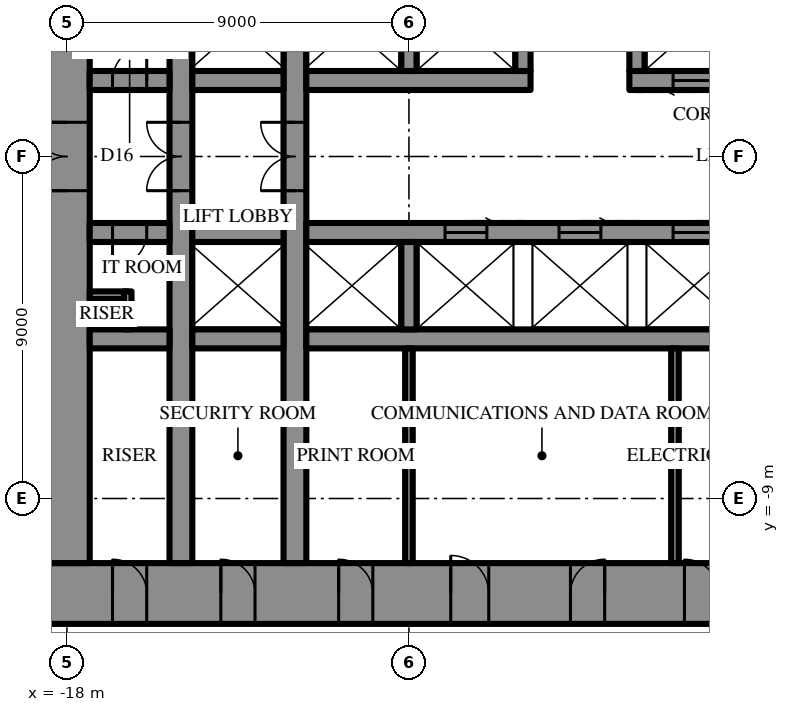
"""IFC4 building model, lengths in metres.
Left out: names, types, materials, properties, quantities, classifications, styles, units other than length and angle.
Written with IfcOpenShell. Run it as: python <this file> out.ifc"""

import sys

from ifc_helpers import new_model, si_unit, direction, frame, frame_2d, origin, place, context, subcontext, project, spatial, rectangle, extrude, element, fill, save


model = new_model("IFC4")
c1 = context("Model", 3, precision=1e-05, world=origin(), true_north=direction((0.0, 1.0)))
c2 = subcontext(c1, "Body", "Model", "MODEL_VIEW")
j1 = project(units=[si_unit("LENGTHUNIT", "METRE"), si_unit("PLANEANGLEUNIT", "RADIAN")], contexts=[c1])
p1 = place(None, origin())
s1 = spatial("IfcSite", under=j1, at=p1, CompositionType="ELEMENT")
p2 = place(p1, origin())
s2 = spatial("IfcBuilding", under=s1, at=p2, CompositionType="ELEMENT")
p3 = place(p2, frame((0.0, 0.0, 123.7)))
s3 = spatial("IfcBuildingStorey", under=s2, at=p3, CompositionType="ELEMENT", Elevation=123.7)
p4 = place(p3, frame((18.6, -11.5, 0.0), z_axis=(0.0, 0.0, 1.0), x_axis=(-1.0, 0.0, 0.0)))
e1 = element("IfcWall", 1, at=p4, inside=s3, PredefinedType="SHEAR", context=c2, shape_type="SweptSolid", body=[
    extrude(rectangle(XDim=37.2, YDim=1.6, at=frame_2d((18.6, 0.0))), origin(), (0.0, 0.0, 1.0), 4.2),
])
p5 = place(p4, frame((19.45, 0.0, 0.0)))
e2 = element("IfcOpeningElement", 2, at=p5, cuts=e1, PredefinedType="OPENING", context=c2, shape_type="SweptSolid", body=[
    extrude(rectangle(XDim=0.9, YDim=2.2, at=frame_2d((0.45, 1.1))), frame((0.0, 0.81, 0.0), z_axis=(0.0, -1.0, 0.0), x_axis=(1.0, 0.0, 0.0)), (0.0, 0.0, 1.0), 1.62),
])
p6 = place(p4, frame((22.45, 0.0, 0.0)))
e3 = element("IfcOpeningElement", 3, at=p6, cuts=e1, PredefinedType="OPENING", context=c2, shape_type="SweptSolid", body=[
    extrude(rectangle(XDim=0.9, YDim=2.2, at=frame_2d((0.45, 1.1))), frame((0.0, 0.81, 0.0), z_axis=(0.0, -1.0, 0.0), x_axis=(1.0, 0.0, 0.0)), (0.0, 0.0, 1.0), 1.62),
])
p7 = place(p4, frame((25.5, 0.0, 0.0)))
e4 = element("IfcOpeningElement", 4, at=p7, cuts=e1, PredefinedType="OPENING", context=c2, shape_type="SweptSolid", body=[
    extrude(rectangle(XDim=1.0, YDim=2.2, at=frame_2d((0.5, 1.1))), frame((0.0, 0.81, 0.0), z_axis=(0.0, -1.0, 0.0), x_axis=(1.0, 0.0, 0.0)), (0.0, 0.0, 1.0), 1.62),
])
p8 = place(p4, frame((1.8, 0.0, 0.0)))
e5 = element("IfcOpeningElement", 5, at=p8, cuts=e1, PredefinedType="OPENING", context=c2, shape_type="SweptSolid", body=[
    extrude(rectangle(XDim=0.9, YDim=2.2, at=frame_2d((0.45, 1.1))), frame((0.0, 0.81, 0.0), z_axis=(0.0, -1.0, 0.0), x_axis=(1.0, 0.0, 0.0)), (0.0, 0.0, 1.0), 1.62),
])
p9 = place(p4, frame((4.65, 0.0, 0.0)))
e6 = element("IfcOpeningElement", 6, at=p9, cuts=e1, PredefinedType="OPENING", context=c2, shape_type="SweptSolid", body=[
    extrude(rectangle(XDim=0.9, YDim=2.2, at=frame_2d((0.45, 1.1))), frame((0.0, 0.81, 0.0), z_axis=(0.0, -1.0, 0.0), x_axis=(1.0, 0.0, 0.0)), (0.0, 0.0, 1.0), 1.62),
])
p10 = place(p4, frame((7.75, 0.0, 0.0)))
e7 = element("IfcOpeningElement", 7, at=p10, cuts=e1, PredefinedType="OPENING", context=c2, shape_type="SweptSolid", body=[
    extrude(rectangle(XDim=0.9, YDim=2.2, at=frame_2d((0.45, 1.1))), frame((0.0, 0.81, 0.0), z_axis=(0.0, -1.0, 0.0), x_axis=(1.0, 0.0, 0.0)), (0.0, 0.0, 1.0), 1.62),
])
p11 = place(p4, frame((28.55, 0.0, 0.0)))
e8 = element("IfcOpeningElement", 8, at=p11, cuts=e1, PredefinedType="OPENING", context=c2, shape_type="SweptSolid", body=[
    extrude(rectangle(XDim=0.9, YDim=2.2, at=frame_2d((0.45, 1.1))), frame((0.0, 0.81, 0.0), z_axis=(0.0, -1.0, 0.0), x_axis=(1.0, 0.0, 0.0)), (0.0, 0.0, 1.0), 1.62),
])
p12 = place(p4, frame((31.65, 0.0, 0.0)))
e9 = element("IfcOpeningElement", 9, at=p12, cuts=e1, PredefinedType="OPENING", context=c2, shape_type="SweptSolid", body=[
    extrude(rectangle(XDim=0.9, YDim=2.2, at=frame_2d((0.45, 1.1))), frame((0.0, 0.81, 0.0), z_axis=(0.0, -1.0, 0.0), x_axis=(1.0, 0.0, 0.0)), (0.0, 0.0, 1.0), 1.62),
])
p13 = place(p4, frame((34.5, 0.0, 0.0)))
e10 = element("IfcOpeningElement", 10, at=p13, cuts=e1, PredefinedType="OPENING", context=c2, shape_type="SweptSolid", body=[
    extrude(rectangle(XDim=0.9, YDim=2.2, at=frame_2d((0.45, 1.1))), frame((0.0, 0.81, 0.0), z_axis=(0.0, -1.0, 0.0), x_axis=(1.0, 0.0, 0.0)), (0.0, 0.0, 1.0), 1.62),
])
p14 = place(p3, frame((-18.0, 10.7, 0.0), z_axis=(0.0, 0.0, 1.0), x_axis=(0.0, -1.0, 0.0)))
e11 = element("IfcWall", 11, at=p14, inside=s3, PredefinedType="SHEAR", context=c2, shape_type="SweptSolid", body=[
    extrude(rectangle(XDim=21.4, YDim=1.2, at=frame_2d((10.7, 0.0))), origin(), (0.0, 0.0, 1.0), 4.2),
])
p15 = place(p14, frame((9.8, 0.0, 0.0)))
e12 = element("IfcOpeningElement", 12, at=p15, cuts=e11, PredefinedType="OPENING", context=c2, shape_type="SweptSolid", body=[
    extrude(rectangle(XDim=1.8, YDim=2.4, at=frame_2d((0.9, 1.2))), frame((0.0, 0.61, 0.0), z_axis=(0.0, -1.0, 0.0), x_axis=(1.0, 0.0, 0.0)), (0.0, 0.0, 1.0), 1.22),
])
p16 = place(p3, frame((-12.0, -10.7, 0.0), z_axis=(0.0, 0.0, 1.0), x_axis=(0.0, 1.0, 0.0)))
e13 = element("IfcWall", 13, at=p16, inside=s3, PredefinedType="SHEAR", context=c2, shape_type="SweptSolid", body=[
    extrude(rectangle(XDim=21.4, YDim=0.6, at=frame_2d((10.7, 0.0))), origin(), (0.0, 0.0, 1.0), 4.2),
])
p17 = place(p16, frame((9.8, 0.0, 0.0)))
e14 = element("IfcOpeningElement", 14, at=p17, cuts=e13, PredefinedType="OPENING", context=c2, shape_type="SweptSolid", body=[
    extrude(rectangle(XDim=1.8, YDim=2.4, at=frame_2d((0.9, 1.2))), frame((0.0, 0.31, 0.0), z_axis=(0.0, -1.0, 0.0), x_axis=(1.0, 0.0, 0.0)), (0.0, 0.0, 1.0), 0.62),
])
p18 = place(p3, frame((-15.0, -10.7, 0.0), z_axis=(0.0, 0.0, 1.0), x_axis=(0.0, 1.0, 0.0)))
e15 = element("IfcWall", 15, at=p18, inside=s3, PredefinedType="SHEAR", context=c2, shape_type="SweptSolid", body=[
    extrude(rectangle(XDim=21.4, YDim=0.6, at=frame_2d((10.7, 0.0))), origin(), (0.0, 0.0, 1.0), 4.2),
])
p19 = place(p18, frame((9.8, 0.0, 0.0)))
e16 = element("IfcOpeningElement", 16, at=p19, cuts=e15, PredefinedType="OPENING", context=c2, shape_type="SweptSolid", body=[
    extrude(rectangle(XDim=1.8, YDim=2.4, at=frame_2d((0.9, 1.2))), frame((0.0, 0.31, 0.0), z_axis=(0.0, -1.0, 0.0), x_axis=(1.0, 0.0, 0.0)), (0.0, 0.0, 1.0), 0.62),
])
p20 = place(p3, frame((-17.4, 2.0, 0.0), z_axis=(0.0, 0.0, 1.0), x_axis=(1.0, 0.0, 0.0)))
e17 = element("IfcWall", 17, at=p20, inside=s3, PredefinedType="SHEAR", context=c2, shape_type="SweptSolid", body=[
    extrude(rectangle(XDim=2.1, YDim=0.5, at=frame_2d((1.05, 0.0))), origin(), (0.0, 0.0, 1.0), 4.2),
])
p21 = place(p20, frame((0.6, 0.0, 0.0)))
e18 = element("IfcOpeningElement", 18, at=p21, cuts=e17, PredefinedType="OPENING", context=c2, shape_type="SweptSolid", body=[
    extrude(rectangle(XDim=0.9, YDim=2.2, at=frame_2d((0.45, 1.1))), frame((0.0, 0.26, 0.0), z_axis=(0.0, -1.0, 0.0), x_axis=(1.0, 0.0, 0.0)), (0.0, 0.0, 1.0), 0.52),
])
p22 = place(p3, frame((-14.7, 2.0, 0.0), z_axis=(0.0, 0.0, 1.0), x_axis=(1.0, 0.0, 0.0)))
e19 = element("IfcWall", 19, at=p22, inside=s3, PredefinedType="SHEAR", context=c2, shape_type="SweptSolid", body=[
    extrude(rectangle(XDim=2.4, YDim=0.5, at=frame_2d((1.2, 0.0))), origin(), (0.0, 0.0, 1.0), 4.2),
])
p23 = place(p3, frame((-11.7, 2.0, 0.0), z_axis=(0.0, 0.0, 1.0), x_axis=(1.0, 0.0, 0.0)))
e20 = element("IfcWall", 20, at=p23, inside=s3, PredefinedType="SHEAR", context=c2, shape_type="SweptSolid", body=[
    extrude(rectangle(XDim=5.9, YDim=0.5, at=frame_2d((2.95, 0.0))), origin(), (0.0, 0.0, 1.0), 4.2),
])
p24 = place(p3, frame((-3.2, 2.0, 0.0), z_axis=(0.0, 0.0, 1.0), x_axis=(1.0, 0.0, 0.0)))
e21 = element("IfcWall", 21, at=p24, inside=s3, PredefinedType="SHEAR", context=c2, shape_type="SweptSolid", body=[
    extrude(rectangle(XDim=14.9, YDim=0.5, at=frame_2d((7.45, 0.0))), origin(), (0.0, 0.0, 1.0), 4.2),
])
p25 = place(p24, frame((1.15, 0.0, 0.0)))
e22 = element("IfcOpeningElement", 22, at=p25, cuts=e21, PredefinedType="OPENING", context=c2, shape_type="SweptSolid", body=[
    extrude(rectangle(XDim=1.1, YDim=2.2, at=frame_2d((0.55, 1.1))), frame((0.0, 0.26, 0.0), z_axis=(0.0, -1.0, 0.0), x_axis=(1.0, 0.0, 0.0)), (0.0, 0.0, 1.0), 0.52),
])
p26 = place(p24, frame((4.15, 0.0, 0.0)))
e23 = element("IfcOpeningElement", 23, at=p26, cuts=e21, PredefinedType="OPENING", context=c2, shape_type="SweptSolid", body=[
    extrude(rectangle(XDim=1.1, YDim=2.2, at=frame_2d((0.55, 1.1))), frame((0.0, 0.26, 0.0), z_axis=(0.0, -1.0, 0.0), x_axis=(1.0, 0.0, 0.0)), (0.0, 0.0, 1.0), 0.52),
])
p27 = place(p24, frame((7.15, 0.0, 0.0)))
e24 = element("IfcOpeningElement", 24, at=p27, cuts=e21, PredefinedType="OPENING", context=c2, shape_type="SweptSolid", body=[
    extrude(rectangle(XDim=1.1, YDim=2.2, at=frame_2d((0.55, 1.1))), frame((0.0, 0.26, 0.0), z_axis=(0.0, -1.0, 0.0), x_axis=(1.0, 0.0, 0.0)), (0.0, 0.0, 1.0), 0.52),
])
p28 = place(p24, frame((10.15, 0.0, 0.0)))
e25 = element("IfcOpeningElement", 25, at=p28, cuts=e21, PredefinedType="OPENING", context=c2, shape_type="SweptSolid", body=[
    extrude(rectangle(XDim=1.1, YDim=2.2, at=frame_2d((0.55, 1.1))), frame((0.0, 0.26, 0.0), z_axis=(0.0, -1.0, 0.0), x_axis=(1.0, 0.0, 0.0)), (0.0, 0.0, 1.0), 0.52),
])
for number, where, z_axis, x_axis in (
    (26, (-9.0, 2.25, 0.0), (0.0, 0.0, 1.0), (0.0, 1.0, 0.0)),
    (27, (-6.0, 2.25, 0.0), (0.0, 0.0, 1.0), (0.0, 1.0, 0.0)),
    (28, (-3.0, 2.25, 0.0), (0.0, 0.0, 1.0), (0.0, 1.0, 0.0)),
):
    element("IfcWall", number, at=place(p3, frame(where, z_axis=z_axis, x_axis=x_axis)), inside=s3, PredefinedType="SHEAR", context=c2, shape_type="SweptSolid", body=[
        extrude(rectangle(XDim=2.3, YDim=0.4, at=frame_2d((1.15, 0.0))), origin(), (0.0, 0.0, 1.0), 4.2),
    ])
p29 = place(p3, frame((3.2, -2.0, 0.0), z_axis=(0.0, 0.0, 1.0), x_axis=(-1.0, 0.0, 0.0)))
e29 = element("IfcWall", 29, at=p29, inside=s3, PredefinedType="SHEAR", context=c2, shape_type="SweptSolid", body=[
    extrude(rectangle(XDim=14.9, YDim=0.5, at=frame_2d((7.45, 0.0))), origin(), (0.0, 0.0, 1.0), 4.2),
])
p30 = place(p29, frame((1.15, 0.0, 0.0)))
e30 = element("IfcOpeningElement", 30, at=p30, cuts=e29, PredefinedType="OPENING", context=c2, shape_type="SweptSolid", body=[
    extrude(rectangle(XDim=1.1, YDim=2.2, at=frame_2d((0.55, 1.1))), frame((0.0, 0.26, 0.0), z_axis=(0.0, -1.0, 0.0), x_axis=(1.0, 0.0, 0.0)), (0.0, 0.0, 1.0), 0.52),
])
p31 = place(p29, frame((4.15, 0.0, 0.0)))
e31 = element("IfcOpeningElement", 31, at=p31, cuts=e29, PredefinedType="OPENING", context=c2, shape_type="SweptSolid", body=[
    extrude(rectangle(XDim=1.1, YDim=2.2, at=frame_2d((0.55, 1.1))), frame((0.0, 0.26, 0.0), z_axis=(0.0, -1.0, 0.0), x_axis=(1.0, 0.0, 0.0)), (0.0, 0.0, 1.0), 0.52),
])
p32 = place(p29, frame((7.15, 0.0, 0.0)))
e32 = element("IfcOpeningElement", 32, at=p32, cuts=e29, PredefinedType="OPENING", context=c2, shape_type="SweptSolid", body=[
    extrude(rectangle(XDim=1.1, YDim=2.2, at=frame_2d((0.55, 1.1))), frame((0.0, 0.26, 0.0), z_axis=(0.0, -1.0, 0.0), x_axis=(1.0, 0.0, 0.0)), (0.0, 0.0, 1.0), 0.52),
])
p33 = place(p29, frame((10.15, 0.0, 0.0)))
e33 = element("IfcOpeningElement", 33, at=p33, cuts=e29, PredefinedType="OPENING", context=c2, shape_type="SweptSolid", body=[
    extrude(rectangle(XDim=1.1, YDim=2.2, at=frame_2d((0.55, 1.1))), frame((0.0, 0.26, 0.0), z_axis=(0.0, -1.0, 0.0), x_axis=(1.0, 0.0, 0.0)), (0.0, 0.0, 1.0), 0.52),
])
p34 = place(p3, frame((-12.3, -2.0, 0.0), z_axis=(0.0, 0.0, 1.0), x_axis=(-1.0, 0.0, 0.0)))
e34 = element("IfcWall", 34, at=p34, inside=s3, PredefinedType="SHEAR", context=c2, shape_type="SweptSolid", body=[
    extrude(rectangle(XDim=2.4, YDim=0.5, at=frame_2d((1.2, 0.0))), origin(), (0.0, 0.0, 1.0), 4.2),
])
p35 = place(p3, frame((-15.3, -2.0, 0.0), z_axis=(0.0, 0.0, 1.0), x_axis=(-1.0, 0.0, 0.0)))
e35 = element("IfcWall", 35, at=p35, inside=s3, PredefinedType="SHEAR", context=c2, shape_type="SweptSolid", body=[
    extrude(rectangle(XDim=2.1, YDim=0.5, at=frame_2d((1.05, 0.0))), origin(), (0.0, 0.0, 1.0), 4.2),
])
p36 = place(p35, frame((0.6, 0.0, 0.0)))
e36 = element("IfcOpeningElement", 36, at=p36, cuts=e35, PredefinedType="OPENING", context=c2, shape_type="SweptSolid", body=[
    extrude(rectangle(XDim=0.9, YDim=2.2, at=frame_2d((0.45, 1.1))), frame((0.0, 0.26, 0.0), z_axis=(0.0, -1.0, 0.0), x_axis=(1.0, 0.0, 0.0)), (0.0, 0.0, 1.0), 0.52),
])
p37 = place(p3, frame((11.7, -4.8, 0.0), z_axis=(0.0, 0.0, 1.0), x_axis=(-1.0, 0.0, 0.0)))
e37 = element("IfcWall", 37, at=p37, inside=s3, PredefinedType="SHEAR", context=c2, shape_type="SweptSolid", body=[
    extrude(rectangle(XDim=23.4, YDim=0.5, at=frame_2d((11.7, 0.0))), origin(), (0.0, 0.0, 1.0), 4.2),
])
p38 = place(p37, frame((6.6, 0.0, 0.0)))
e38 = element("IfcOpeningElement", 38, at=p38, cuts=e37, PredefinedType="OPENING", context=c2, shape_type="SweptSolid", body=[
    extrude(rectangle(XDim=1.2, YDim=2.2, at=frame_2d((0.6, 1.1))), frame((0.0, 0.26, 0.0), z_axis=(0.0, -1.0, 0.0), x_axis=(1.0, 0.0, 0.0)), (0.0, 0.0, 1.0), 0.52),
])
p39 = place(p37, frame((3.6, 0.0, 0.0)))
e39 = element("IfcOpeningElement", 39, at=p39, cuts=e37, PredefinedType="OPENING", context=c2, shape_type="SweptSolid", body=[
    extrude(rectangle(XDim=1.2, YDim=2.2, at=frame_2d((0.6, 1.1))), frame((0.0, 0.26, 0.0), z_axis=(0.0, -1.0, 0.0), x_axis=(1.0, 0.0, 0.0)), (0.0, 0.0, 1.0), 0.52),
])
p40 = place(p3, frame((-12.3, -4.8, 0.0), z_axis=(0.0, 0.0, 1.0), x_axis=(-1.0, 0.0, 0.0)))
e40 = element("IfcWall", 40, at=p40, inside=s3, PredefinedType="SHEAR", context=c2, shape_type="SweptSolid", body=[
    extrude(rectangle(XDim=2.4, YDim=0.5, at=frame_2d((1.2, 0.0))), origin(), (0.0, 0.0, 1.0), 4.2),
])
p41 = place(p3, frame((-15.3, -4.8, 0.0), z_axis=(0.0, 0.0, 1.0), x_axis=(-1.0, 0.0, 0.0)))
e41 = element("IfcWall", 41, at=p41, inside=s3, PredefinedType="SHEAR", context=c2, shape_type="SweptSolid", body=[
    extrude(rectangle(XDim=2.1, YDim=0.5, at=frame_2d((1.05, 0.0))), origin(), (0.0, 0.0, 1.0), 4.2),
])
p42 = place(p3, frame((-9.0, -2.25, 0.0), z_axis=(0.0, 0.0, 1.0), x_axis=(0.0, -1.0, 0.0)))
e42 = element("IfcWall", 42, at=p42, inside=s3, PredefinedType="SHEAR", context=c2, shape_type="SweptSolid", body=[
    extrude(rectangle(XDim=2.3, YDim=0.4, at=frame_2d((1.15, 0.0))), origin(), (0.0, 0.0, 1.0), 4.2),
])
for number, where, z_axis, x_axis in (
    (43, (-9.0, -5.05, 0.0), (0.0, 0.0, 1.0), (0.0, -1.0, 0.0)),
    (44, (-2.0, -5.05, 0.0), (0.0, 0.0, 1.0), (0.0, -1.0, 0.0)),
):
    element("IfcWall", number, at=place(p3, frame(where, z_axis=z_axis, x_axis=x_axis)), inside=s3, PredefinedType="PARTITIONING", context=c2, shape_type="SweptSolid", body=[
        extrude(rectangle(XDim=5.65, YDim=0.2, at=frame_2d((2.825, 0.0))), origin(), (0.0, 0.0, 1.0), 4.0),
    ])
for number, where, z_axis, x_axis in (
    (45, (-16.4, -3.65, 0.0), (0.0, 0.0, 1.0), (-1.0, 0.0, 0.0)),
    (46, (-16.4, -3.55, 0.0), (0.0, 0.0, 1.0), (0.0, -1.0, 0.0)),
):
    element("IfcWall", number, at=place(p3, frame(where, z_axis=z_axis, x_axis=x_axis)), inside=s3, PredefinedType="PARTITIONING", context=c2, shape_type="SweptSolid", body=[
        extrude(rectangle(XDim=1.0, YDim=0.2, at=frame_2d((0.5, 0.0))), origin(), (0.0, 0.0, 1.0), 4.0),
    ])
p43 = place(p15, frame((1.8, 0.0, 0.0), z_axis=(0.0, 0.0, 1.0), x_axis=(-1.0, 0.0, 0.0)))
e47 = element("IfcDoor", 47, at=p43, inside=s3, OperationType="DOUBLE_DOOR_SINGLE_SWING", PredefinedType="DOOR", context=c2, shape_type="SweptSolid", body=[
    extrude(rectangle(XDim=1.8, YDim=2.4, at=frame_2d((0.9, 1.2))), frame((0.0, 0.025, 0.0), z_axis=(0.0, -1.0, 0.0), x_axis=(1.0, 0.0, 0.0)), (0.0, 0.0, 1.0), 0.05),
])
fill(e12, e47)
p44 = place(p5, frame((0.9, 0.0, 0.0), z_axis=(0.0, 0.0, 1.0), x_axis=(-1.0, 0.0, 0.0)))
e48 = element("IfcDoor", 48, at=p44, inside=s3, OperationType="SINGLE_SWING_RIGHT", PredefinedType="DOOR", context=c2, shape_type="SweptSolid", body=[
    extrude(rectangle(XDim=0.9, YDim=2.2, at=frame_2d((0.45, 1.1))), frame((0.0, 0.025, 0.0), z_axis=(0.0, -1.0, 0.0), x_axis=(1.0, 0.0, 0.0)), (0.0, 0.0, 1.0), 0.05),
])
fill(e2, e48)
p45 = place(p6, frame((0.9, 0.0, 0.0), z_axis=(0.0, 0.0, 1.0), x_axis=(-1.0, 0.0, 0.0)))
e49 = element("IfcDoor", 49, at=p45, inside=s3, OperationType="SINGLE_SWING_LEFT", PredefinedType="DOOR", context=c2, shape_type="SweptSolid", body=[
    extrude(rectangle(XDim=0.9, YDim=2.2, at=frame_2d((0.45, 1.1))), frame((0.0, 0.025, 0.0), z_axis=(0.0, -1.0, 0.0), x_axis=(1.0, 0.0, 0.0)), (0.0, 0.0, 1.0), 0.05),
])
fill(e3, e49)
p46 = place(p7, frame((1.0, 0.0, 0.0), z_axis=(0.0, 0.0, 1.0), x_axis=(-1.0, 0.0, 0.0)))
e50 = element("IfcDoor", 50, at=p46, inside=s3, OperationType="SINGLE_SWING_RIGHT", PredefinedType="DOOR", context=c2, shape_type="SweptSolid", body=[
    extrude(rectangle(XDim=1.0, YDim=2.2, at=frame_2d((0.5, 1.1))), frame((0.0, 0.025, 0.0), z_axis=(0.0, -1.0, 0.0), x_axis=(1.0, 0.0, 0.0)), (0.0, 0.0, 1.0), 0.05),
])
fill(e4, e50)
p47 = place(p11, frame((0.9, 0.0, 0.0), z_axis=(0.0, 0.0, 1.0), x_axis=(-1.0, 0.0, 0.0)))
e51 = element("IfcDoor", 51, at=p47, inside=s3, OperationType="SINGLE_SWING_RIGHT", PredefinedType="DOOR", context=c2, shape_type="SweptSolid", body=[
    extrude(rectangle(XDim=0.9, YDim=2.2, at=frame_2d((0.45, 1.1))), frame((0.0, 0.025, 0.0), z_axis=(0.0, -1.0, 0.0), x_axis=(1.0, 0.0, 0.0)), (0.0, 0.0, 1.0), 0.05),
])
fill(e8, e51)
p48 = place(p12, frame((0.9, 0.0, 0.0), z_axis=(0.0, 0.0, 1.0), x_axis=(-1.0, 0.0, 0.0)))
e52 = element("IfcDoor", 52, at=p48, inside=s3, OperationType="SINGLE_SWING_RIGHT", PredefinedType="DOOR", context=c2, shape_type="SweptSolid", body=[
    extrude(rectangle(XDim=0.9, YDim=2.2, at=frame_2d((0.45, 1.1))), frame((0.0, 0.025, 0.0), z_axis=(0.0, -1.0, 0.0), x_axis=(1.0, 0.0, 0.0)), (0.0, 0.0, 1.0), 0.05),
])
fill(e9, e52)
p49 = place(p13, frame((0.9, 0.0, 0.0), z_axis=(0.0, 0.0, 1.0), x_axis=(-1.0, 0.0, 0.0)))
e53 = element("IfcDoor", 53, at=p49, inside=s3, OperationType="SINGLE_SWING_RIGHT", PredefinedType="DOOR", context=c2, shape_type="SweptSolid", body=[
    extrude(rectangle(XDim=0.9, YDim=2.2, at=frame_2d((0.45, 1.1))), frame((0.0, 0.025, 0.0), z_axis=(0.0, -1.0, 0.0), x_axis=(1.0, 0.0, 0.0)), (0.0, 0.0, 1.0), 0.05),
])
fill(e10, e53)
p50 = place(p21, origin())
e54 = element("IfcDoor", 54, at=p50, inside=s3, OperationType="SINGLE_SWING_LEFT", PredefinedType="DOOR", context=c2, shape_type="SweptSolid", body=[
    extrude(rectangle(XDim=0.9, YDim=2.2, at=frame_2d((0.45, 1.1))), frame((0.0, 0.025, 0.0), z_axis=(0.0, -1.0, 0.0), x_axis=(1.0, 0.0, 0.0)), (0.0, 0.0, 1.0), 0.05),
])
fill(e18, e54)
p51 = place(p36, origin())
e55 = element("IfcDoor", 55, at=p51, inside=s3, OperationType="SINGLE_SWING_LEFT", PredefinedType="DOOR", context=c2, shape_type="SweptSolid", body=[
    extrude(rectangle(XDim=0.9, YDim=2.2, at=frame_2d((0.45, 1.1))), frame((0.0, 0.025, 0.0), z_axis=(0.0, -1.0, 0.0), x_axis=(1.0, 0.0, 0.0)), (0.0, 0.0, 1.0), 0.05),
])
fill(e36, e55)
p52 = place(p17, origin())
e56 = element("IfcDoor", 56, at=p52, inside=s3, OperationType="DOUBLE_DOOR_SINGLE_SWING", PredefinedType="DOOR", context=c2, shape_type="SweptSolid", body=[
    extrude(rectangle(XDim=1.8, YDim=2.4, at=frame_2d((0.9, 1.2))), frame((0.0, 0.025, 0.0), z_axis=(0.0, -1.0, 0.0), x_axis=(1.0, 0.0, 0.0)), (0.0, 0.0, 1.0), 0.05),
])
fill(e14, e56)
p53 = place(p19, origin())
e57 = element("IfcDoor", 57, at=p53, inside=s3, OperationType="DOUBLE_DOOR_SINGLE_SWING", PredefinedType="DOOR", context=c2, shape_type="SweptSolid", body=[
    extrude(rectangle(XDim=1.8, YDim=2.4, at=frame_2d((0.9, 1.2))), frame((0.0, 0.025, 0.0), z_axis=(0.0, -1.0, 0.0), x_axis=(1.0, 0.0, 0.0)), (0.0, 0.0, 1.0), 0.05),
])
fill(e16, e57)
p54 = place(p25, frame((1.1, 0.0, 0.0), z_axis=(0.0, 0.0, 1.0), x_axis=(-1.0, 0.0, 0.0)))
e58 = element("IfcDoor", 58, at=p54, inside=s3, OperationType="SLIDING_TO_LEFT", PredefinedType="DOOR", context=c2, shape_type="SweptSolid", body=[
    extrude(rectangle(XDim=1.1, YDim=2.2, at=frame_2d((0.55, 1.1))), frame((0.0, 0.025, 0.0), z_axis=(0.0, -1.0, 0.0), x_axis=(1.0, 0.0, 0.0)), (0.0, 0.0, 1.0), 0.05),
])
fill(e22, e58)
p55 = place(p31, frame((1.1, 0.0, 0.0), z_axis=(0.0, 0.0, 1.0), x_axis=(-1.0, 0.0, 0.0)))
e59 = element("IfcDoor", 59, at=p55, inside=s3, OperationType="SLIDING_TO_LEFT", PredefinedType="DOOR", context=c2, shape_type="SweptSolid", body=[
    extrude(rectangle(XDim=1.1, YDim=2.2, at=frame_2d((0.55, 1.1))), frame((0.0, 0.025, 0.0), z_axis=(0.0, -1.0, 0.0), x_axis=(1.0, 0.0, 0.0)), (0.0, 0.0, 1.0), 0.05),
])
fill(e31, e59)
p56 = place(p32, frame((1.1, 0.0, 0.0), z_axis=(0.0, 0.0, 1.0), x_axis=(-1.0, 0.0, 0.0)))
e60 = element("IfcDoor", 60, at=p56, inside=s3, OperationType="SLIDING_TO_LEFT", PredefinedType="DOOR", context=c2, shape_type="SweptSolid", body=[
    extrude(rectangle(XDim=1.1, YDim=2.2, at=frame_2d((0.55, 1.1))), frame((0.0, 0.025, 0.0), z_axis=(0.0, -1.0, 0.0), x_axis=(1.0, 0.0, 0.0)), (0.0, 0.0, 1.0), 0.05),
])
fill(e32, e60)
p57 = place(p33, frame((1.1, 0.0, 0.0), z_axis=(0.0, 0.0, 1.0), x_axis=(-1.0, 0.0, 0.0)))
e61 = element("IfcDoor", 61, at=p57, inside=s3, OperationType="SLIDING_TO_LEFT", PredefinedType="DOOR", context=c2, shape_type="SweptSolid", body=[
    extrude(rectangle(XDim=1.1, YDim=2.2, at=frame_2d((0.55, 1.1))), frame((0.0, 0.025, 0.0), z_axis=(0.0, -1.0, 0.0), x_axis=(1.0, 0.0, 0.0)), (0.0, 0.0, 1.0), 0.05),
])
fill(e33, e61)
save(model, sys.argv[1])
